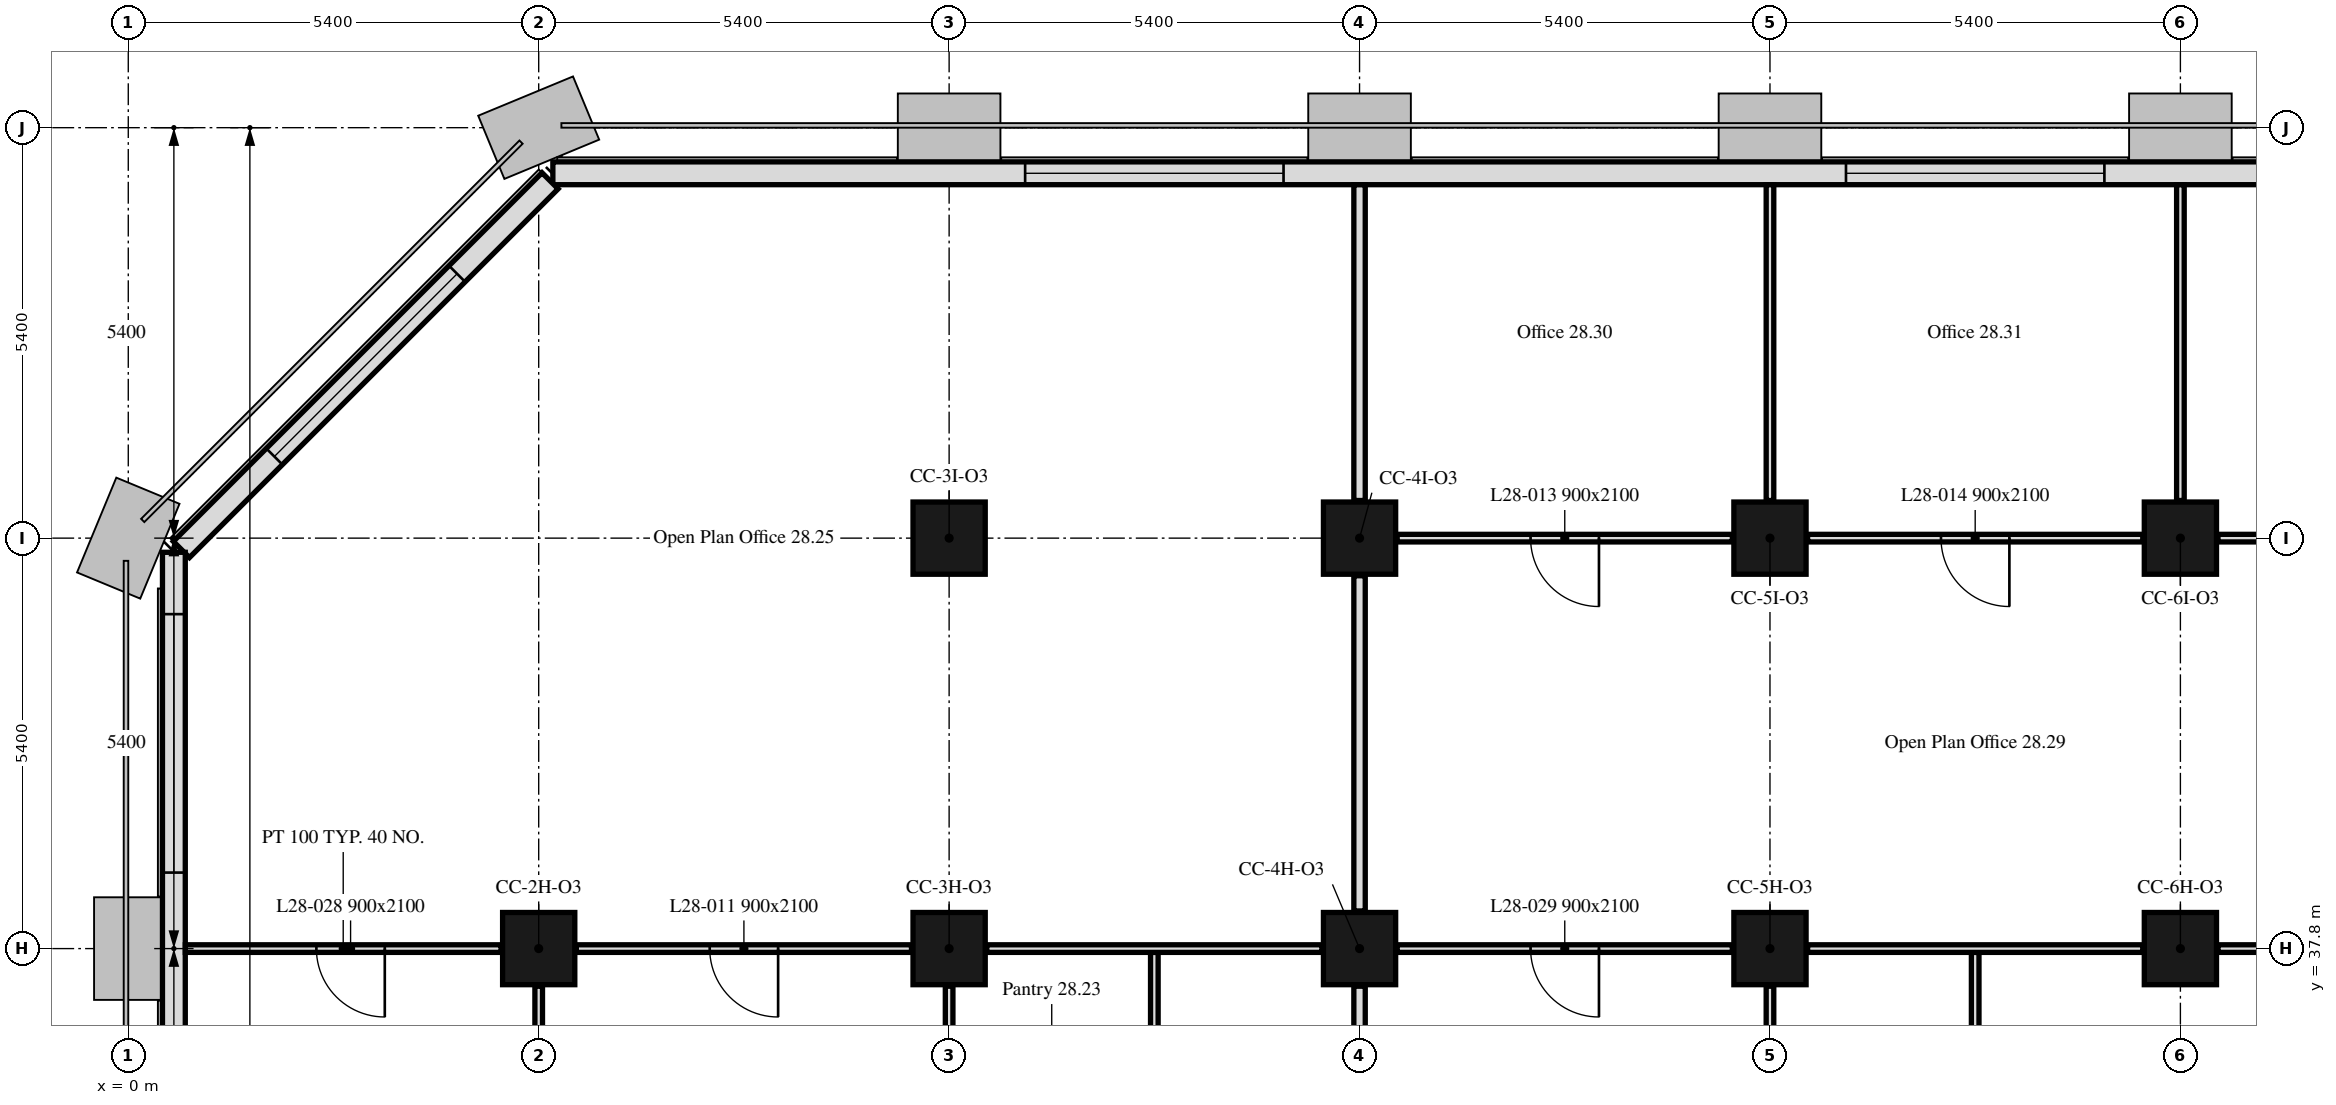
"""IFC4 building model, lengths in metres.
Left out: names, types, materials, properties, quantities, classifications, styles, units other than length and angle.
Written with IfcOpenShell. Run it as: python <this file> out.ifc"""

import sys

from ifc_helpers import new_model, si_unit, direction, frame, frame_2d, origin, origin_2d, place, context, subcontext, project, spatial, rectangle, extrude, element, fill, save


model = new_model("IFC4")
c1 = context("Model", 3, precision=1e-05, world=origin(), true_north=direction((0.0, 1.0)))
c2 = subcontext(c1, "Body", "Model", "MODEL_VIEW")
j1 = project(units=[si_unit("LENGTHUNIT", "METRE"), si_unit("PLANEANGLEUNIT", "RADIAN")], contexts=[c1])
p1 = place(None, origin())
s1 = spatial("IfcSite", under=j1, at=p1, CompositionType="ELEMENT")
p2 = place(p1, origin())
s2 = spatial("IfcBuilding", under=s1, at=p2, CompositionType="ELEMENT")
p3 = place(p2, frame((0.0, 0.0, 118.2)))
s3 = spatial("IfcBuildingStorey", under=s2, at=p3, CompositionType="ELEMENT", Elevation=118.2)
for number, where, z_axis, x_axis in (
    (1, (5.4, 37.8, 0.0), (0.0, 0.0, 1.0), (1.0, 0.0, 0.0)),
    (2, (10.8, 37.8, 0.0), (0.0, 0.0, 1.0), (1.0, 0.0, 0.0)),
    (3, (16.2, 37.8, 0.0), (0.0, 0.0, 1.0), (1.0, 0.0, 0.0)),
    (4, (21.6, 37.8, 0.0), (0.0, 0.0, 1.0), (1.0, 0.0, 0.0)),
    (5, (27.0, 37.8, 0.0), (0.0, 0.0, 1.0), (1.0, 0.0, 0.0)),
    (6, (10.8, 43.2, 0.0), (0.0, 0.0, 1.0), (1.0, 0.0, 0.0)),
    (7, (16.2, 43.2, 0.0), (0.0, 0.0, 1.0), (1.0, 0.0, 0.0)),
    (8, (21.6, 43.2, 0.0), (0.0, 0.0, 1.0), (1.0, 0.0, 0.0)),
    (9, (27.0, 43.2, 0.0), (0.0, 0.0, 1.0), (1.0, 0.0, 0.0)),
):
    element("IfcColumn", number, at=place(p3, frame(where, z_axis=z_axis, x_axis=x_axis)), inside=s3, PredefinedType="COLUMN", context=c2, shape_type="SweptSolid", body=[
        extrude(rectangle(XDim=0.95, YDim=0.95, at=origin_2d()), origin(), (0.0, 0.0, 1.0), 3.5),
    ])
p4 = place(p3, frame((37.614, 48.0, 0.0), z_axis=(0.0, 0.0, 1.0), x_axis=(-1.0, 0.0, 0.0)))
e10 = element("IfcWall", 10, at=p4, inside=s3, PredefinedType="SOLIDWALL", context=c2, shape_type="SweptSolid", body=[
    extrude(rectangle(XDim=32.027, YDim=0.3, at=frame_2d((16.014, 0.0))), origin(), (0.0, 0.0, 1.0), 3.5),
])
p5 = place(p4, frame((0.814, 0.0, 0.9)))
e11 = element("IfcOpeningElement", 11, at=p5, cuts=e10, PredefinedType="OPENING", context=c2, shape_type="SweptSolid", body=[
    extrude(rectangle(XDim=3.4, YDim=1.7, at=frame_2d((1.7, 0.85))), frame((0.0, 0.16, 0.0), z_axis=(0.0, -1.0, 0.0), x_axis=(1.0, 0.0, 0.0)), (0.0, 0.0, 1.0), 0.32),
])
p6 = place(p4, frame((11.614, 0.0, 0.9)))
e12 = element("IfcOpeningElement", 12, at=p6, cuts=e10, PredefinedType="OPENING", context=c2, shape_type="SweptSolid", body=[
    extrude(rectangle(XDim=3.4, YDim=1.7, at=frame_2d((1.7, 0.85))), frame((0.0, 0.16, 0.0), z_axis=(0.0, -1.0, 0.0), x_axis=(1.0, 0.0, 0.0)), (0.0, 0.0, 1.0), 0.32),
])
p7 = place(p4, frame((22.414, 0.0, 0.9)))
e13 = element("IfcOpeningElement", 13, at=p7, cuts=e10, PredefinedType="OPENING", context=c2, shape_type="SweptSolid", body=[
    extrude(rectangle(XDim=3.4, YDim=1.7, at=frame_2d((1.7, 0.85))), frame((0.0, 0.16, 0.0), z_axis=(0.0, -1.0, 0.0), x_axis=(1.0, 0.0, 0.0)), (0.0, 0.0, 1.0), 0.32),
])
p8 = place(p3, frame((5.55, 47.901, 0.0), z_axis=(0.0, 0.0, 1.0), x_axis=(-0.707106781187, -0.707106781187, 0.0)))
e14 = element("IfcWall", 14, at=p8, inside=s3, PredefinedType="SOLIDWALL", context=c2, shape_type="SweptSolid", body=[
    extrude(rectangle(XDim=6.86, YDim=0.3, at=frame_2d((3.43, 0.0))), origin(), (0.0, 0.0, 1.0), 3.5),
])
p9 = place(p8, frame((1.73, 0.0, 0.9)))
e15 = element("IfcOpeningElement", 15, at=p9, cuts=e14, PredefinedType="OPENING", context=c2, shape_type="SweptSolid", body=[
    extrude(rectangle(XDim=3.4, YDim=1.7, at=frame_2d((1.7, 0.85))), frame((0.0, 0.16, 0.0), z_axis=(0.0, -1.0, 0.0), x_axis=(1.0, 0.0, 0.0)), (0.0, 0.0, 1.0), 0.32),
])
p10 = place(p3, frame((0.6, 43.014, 0.0), z_axis=(0.0, 0.0, 1.0), x_axis=(0.0, -1.0, 0.0)))
e16 = element("IfcWall", 16, at=p10, inside=s3, PredefinedType="SOLIDWALL", context=c2, shape_type="SweptSolid", body=[
    extrude(rectangle(XDim=32.027, YDim=0.3, at=frame_2d((16.014, 0.0))), origin(), (0.0, 0.0, 1.0), 3.5),
])
p11 = place(p10, frame((0.814, 0.0, 0.9)))
e17 = element("IfcOpeningElement", 17, at=p11, cuts=e16, PredefinedType="OPENING", context=c2, shape_type="SweptSolid", body=[
    extrude(rectangle(XDim=3.4, YDim=1.7, at=frame_2d((1.7, 0.85))), frame((0.0, 0.16, 0.0), z_axis=(0.0, -1.0, 0.0), x_axis=(1.0, 0.0, 0.0)), (0.0, 0.0, 1.0), 0.32),
])
p12 = place(p10, frame((11.614, 0.0, 0.9)))
e18 = element("IfcOpeningElement", 18, at=p12, cuts=e16, PredefinedType="OPENING", context=c2, shape_type="SweptSolid", body=[
    extrude(rectangle(XDim=3.4, YDim=1.7, at=frame_2d((1.7, 0.85))), frame((0.0, 0.16, 0.0), z_axis=(0.0, -1.0, 0.0), x_axis=(1.0, 0.0, 0.0)), (0.0, 0.0, 1.0), 0.32),
])
p13 = place(p10, frame((22.414, 0.0, 0.9)))
e19 = element("IfcOpeningElement", 19, at=p13, cuts=e16, PredefinedType="OPENING", context=c2, shape_type="SweptSolid", body=[
    extrude(rectangle(XDim=3.4, YDim=1.7, at=frame_2d((1.7, 0.85))), frame((0.0, 0.16, 0.0), z_axis=(0.0, -1.0, 0.0), x_axis=(1.0, 0.0, 0.0)), (0.0, 0.0, 1.0), 0.32),
])
p14 = place(p3, frame((4.905, 37.8, 0.0), z_axis=(0.0, 0.0, 1.0), x_axis=(-1.0, 0.0, 0.0)))
e20 = element("IfcWall", 20, at=p14, inside=s3, PredefinedType="PARTITIONING", context=c2, shape_type="SweptSolid", body=[
    extrude(rectangle(XDim=4.154, YDim=0.1, at=frame_2d((2.077, 0.0))), origin(), (0.0, 0.0, 1.0), 2.75),
])
p15 = place(p14, frame((1.53, 0.0, 0.0)))
e21 = element("IfcOpeningElement", 21, at=p15, cuts=e20, PredefinedType="OPENING", context=c2, shape_type="SweptSolid", body=[
    extrude(rectangle(XDim=0.9, YDim=2.1, at=frame_2d((0.45, 1.05))), frame((0.0, 0.05, 0.0), z_axis=(0.0, -1.0, 0.0), x_axis=(1.0, 0.0, 0.0)), (0.0, 0.0, 1.0), 0.1),
])
p16 = place(p3, frame((5.4, 35.175, 0.0), z_axis=(0.0, 0.0, 1.0), x_axis=(0.0, 1.0, 0.0)))
e22 = element("IfcWall", 22, at=p16, inside=s3, PredefinedType="PARTITIONING", context=c2, shape_type="SweptSolid", body=[
    extrude(rectangle(XDim=2.13, YDim=0.1, at=frame_2d((1.065, 0.0))), origin(), (0.0, 0.0, 1.0), 3.5),
])
p17 = place(p3, frame((10.8, 35.175, 0.0), z_axis=(0.0, 0.0, 1.0), x_axis=(0.0, 1.0, 0.0)))
e23 = element("IfcWall", 23, at=p17, inside=s3, PredefinedType="PARTITIONING", context=c2, shape_type="SweptSolid", body=[
    extrude(rectangle(XDim=2.13, YDim=0.1, at=frame_2d((1.065, 0.0))), origin(), (0.0, 0.0, 1.0), 2.75),
])
p18 = place(p3, frame((10.305, 37.8, 0.0), z_axis=(0.0, 0.0, 1.0), x_axis=(-1.0, 0.0, 0.0)))
e24 = element("IfcWall", 24, at=p18, inside=s3, PredefinedType="PARTITIONING", context=c2, shape_type="SweptSolid", body=[
    extrude(rectangle(XDim=4.41, YDim=0.1, at=frame_2d((2.205, 0.0))), origin(), (0.0, 0.0, 1.0), 2.75),
])
p19 = place(p18, frame((1.755, 0.0, 0.0)))
e25 = element("IfcOpeningElement", 25, at=p19, cuts=e24, PredefinedType="OPENING", context=c2, shape_type="SweptSolid", body=[
    extrude(rectangle(XDim=0.9, YDim=2.1, at=frame_2d((0.45, 1.05))), frame((0.0, 0.05, 0.0), z_axis=(0.0, -1.0, 0.0), x_axis=(1.0, 0.0, 0.0)), (0.0, 0.0, 1.0), 0.1),
])
p20 = place(p3, frame((13.5, 35.175, 0.0), z_axis=(0.0, 0.0, 1.0), x_axis=(0.0, 1.0, 0.0)))
e26 = element("IfcWall", 26, at=p20, inside=s3, PredefinedType="PARTITIONING", context=c2, shape_type="SweptSolid", body=[
    extrude(rectangle(XDim=2.575, YDim=0.1, at=frame_2d((1.288, 0.0))), origin(), (0.0, 0.0, 1.0), 3.5),
])
p21 = place(p3, frame((16.2, 35.175, 0.0), z_axis=(0.0, 0.0, 1.0), x_axis=(0.0, 1.0, 0.0)))
e27 = element("IfcWall", 27, at=p21, inside=s3, PredefinedType="PARTITIONING", context=c2, shape_type="SweptSolid", body=[
    extrude(rectangle(XDim=2.13, YDim=0.15, at=frame_2d((1.065, 0.0))), origin(), (0.0, 0.0, 1.0), 2.75),
])
p22 = place(p3, frame((15.705, 37.8, 0.0), z_axis=(0.0, 0.0, 1.0), x_axis=(-1.0, 0.0, 0.0)))
e28 = element("IfcWall", 28, at=p22, inside=s3, PredefinedType="PARTITIONING", context=c2, shape_type="SweptSolid", body=[
    extrude(rectangle(XDim=4.41, YDim=0.1, at=frame_2d((2.205, 0.0))), origin(), (0.0, 0.0, 1.0), 2.75),
])
p23 = place(p3, frame((16.2, 38.295, 0.0), z_axis=(0.0, 0.0, 1.0), x_axis=(0.0, 1.0, 0.0)))
e29 = element("IfcWall", 29, at=p23, inside=s3, PredefinedType="PARTITIONING", context=c2, shape_type="SweptSolid", body=[
    extrude(rectangle(XDim=4.41, YDim=0.15, at=frame_2d((2.205, 0.0))), origin(), (0.0, 0.0, 1.0), 2.75),
])
p24 = place(p3, frame((16.2, 43.695, 0.0), z_axis=(0.0, 0.0, 1.0), x_axis=(0.0, 1.0, 0.0)))
e30 = element("IfcWall", 30, at=p24, inside=s3, PredefinedType="PARTITIONING", context=c2, shape_type="SweptSolid", body=[
    extrude(rectangle(XDim=4.154, YDim=0.15, at=frame_2d((2.077, 0.0))), origin(), (0.0, 0.0, 1.0), 2.75),
])
p25 = place(p3, frame((21.6, 35.175, 0.0), z_axis=(0.0, 0.0, 1.0), x_axis=(0.0, 1.0, 0.0)))
e31 = element("IfcWall", 31, at=p25, inside=s3, PredefinedType="PARTITIONING", context=c2, shape_type="SweptSolid", body=[
    extrude(rectangle(XDim=2.13, YDim=0.1, at=frame_2d((1.065, 0.0))), origin(), (0.0, 0.0, 1.0), 2.75),
])
p26 = place(p3, frame((21.105, 37.8, 0.0), z_axis=(0.0, 0.0, 1.0), x_axis=(-1.0, 0.0, 0.0)))
e32 = element("IfcWall", 32, at=p26, inside=s3, PredefinedType="PARTITIONING", context=c2, shape_type="SweptSolid", body=[
    extrude(rectangle(XDim=4.41, YDim=0.1, at=frame_2d((2.205, 0.0))), origin(), (0.0, 0.0, 1.0), 3.5),
])
p27 = place(p26, frame((1.755, 0.0, 0.0)))
e33 = element("IfcOpeningElement", 33, at=p27, cuts=e32, PredefinedType="OPENING", context=c2, shape_type="SweptSolid", body=[
    extrude(rectangle(XDim=0.9, YDim=2.1, at=frame_2d((0.45, 1.05))), frame((0.0, 0.05, 0.0), z_axis=(0.0, -1.0, 0.0), x_axis=(1.0, 0.0, 0.0)), (0.0, 0.0, 1.0), 0.1),
])
p28 = place(p3, frame((24.3, 35.175, 0.0), z_axis=(0.0, 0.0, 1.0), x_axis=(0.0, 1.0, 0.0)))
e34 = element("IfcWall", 34, at=p28, inside=s3, PredefinedType="PARTITIONING", context=c2, shape_type="SweptSolid", body=[
    extrude(rectangle(XDim=2.575, YDim=0.1, at=frame_2d((1.288, 0.0))), origin(), (0.0, 0.0, 1.0), 3.5),
])
p29 = place(p3, frame((31.905, 37.8, 0.0), z_axis=(0.0, 0.0, 1.0), x_axis=(-1.0, 0.0, 0.0)))
e35 = element("IfcWall", 35, at=p29, inside=s3, PredefinedType="PARTITIONING", context=c2, shape_type="SweptSolid", body=[
    extrude(rectangle(XDim=4.41, YDim=0.1, at=frame_2d((2.205, 0.0))), origin(), (0.0, 0.0, 1.0), 3.5),
])
p30 = place(p29, frame((1.755, 0.0, 0.0)))
e36 = element("IfcOpeningElement", 36, at=p30, cuts=e35, PredefinedType="OPENING", context=c2, shape_type="SweptSolid", body=[
    extrude(rectangle(XDim=0.9, YDim=2.1, at=frame_2d((0.45, 1.05))), frame((0.0, 0.05, 0.0), z_axis=(0.0, -1.0, 0.0), x_axis=(1.0, 0.0, 0.0)), (0.0, 0.0, 1.0), 0.1),
])
p31 = place(p3, frame((26.505, 37.8, 0.0), z_axis=(0.0, 0.0, 1.0), x_axis=(-1.0, 0.0, 0.0)))
e37 = element("IfcWall", 37, at=p31, inside=s3, PredefinedType="PARTITIONING", context=c2, shape_type="SweptSolid", body=[
    extrude(rectangle(XDim=4.41, YDim=0.1, at=frame_2d((2.205, 0.0))), origin(), (0.0, 0.0, 1.0), 3.5),
])
p32 = place(p3, frame((31.905, 43.2, 0.0), z_axis=(0.0, 0.0, 1.0), x_axis=(-1.0, 0.0, 0.0)))
e38 = element("IfcWall", 38, at=p32, inside=s3, PredefinedType="PARTITIONING", context=c2, shape_type="SweptSolid", body=[
    extrude(rectangle(XDim=4.41, YDim=0.1, at=frame_2d((2.205, 0.0))), origin(), (0.0, 0.0, 1.0), 3.5),
])
p33 = place(p32, frame((1.755, 0.0, 0.0)))
e39 = element("IfcOpeningElement", 39, at=p33, cuts=e38, PredefinedType="OPENING", context=c2, shape_type="SweptSolid", body=[
    extrude(rectangle(XDim=0.9, YDim=2.1, at=frame_2d((0.45, 1.05))), frame((0.0, 0.05, 0.0), z_axis=(0.0, -1.0, 0.0), x_axis=(1.0, 0.0, 0.0)), (0.0, 0.0, 1.0), 0.1),
])
p34 = place(p3, frame((26.505, 43.2, 0.0), z_axis=(0.0, 0.0, 1.0), x_axis=(-1.0, 0.0, 0.0)))
e40 = element("IfcWall", 40, at=p34, inside=s3, PredefinedType="PARTITIONING", context=c2, shape_type="SweptSolid", body=[
    extrude(rectangle(XDim=4.41, YDim=0.1, at=frame_2d((2.205, 0.0))), origin(), (0.0, 0.0, 1.0), 3.5),
])
p35 = place(p34, frame((1.755, 0.0, 0.0)))
e41 = element("IfcOpeningElement", 41, at=p35, cuts=e40, PredefinedType="OPENING", context=c2, shape_type="SweptSolid", body=[
    extrude(rectangle(XDim=0.9, YDim=2.1, at=frame_2d((0.45, 1.05))), frame((0.0, 0.05, 0.0), z_axis=(0.0, -1.0, 0.0), x_axis=(1.0, 0.0, 0.0)), (0.0, 0.0, 1.0), 0.1),
])
p36 = place(p3, frame((21.105, 43.2, 0.0), z_axis=(0.0, 0.0, 1.0), x_axis=(-1.0, 0.0, 0.0)))
e42 = element("IfcWall", 42, at=p36, inside=s3, PredefinedType="PARTITIONING", context=c2, shape_type="SweptSolid", body=[
    extrude(rectangle(XDim=4.41, YDim=0.1, at=frame_2d((2.205, 0.0))), origin(), (0.0, 0.0, 1.0), 3.5),
])
p37 = place(p36, frame((1.755, 0.0, 0.0)))
e43 = element("IfcOpeningElement", 43, at=p37, cuts=e42, PredefinedType="OPENING", context=c2, shape_type="SweptSolid", body=[
    extrude(rectangle(XDim=0.9, YDim=2.1, at=frame_2d((0.45, 1.05))), frame((0.0, 0.05, 0.0), z_axis=(0.0, -1.0, 0.0), x_axis=(1.0, 0.0, 0.0)), (0.0, 0.0, 1.0), 0.1),
])
for number, where, z_axis, x_axis in (
    (44, (21.6, 43.695, 0.0), (0.0, 0.0, 1.0), (0.0, 1.0, 0.0)),
    (45, (27.0, 43.695, 0.0), (0.0, 0.0, 1.0), (0.0, 1.0, 0.0)),
):
    element("IfcWall", number, at=place(p3, frame(where, z_axis=z_axis, x_axis=x_axis)), inside=s3, PredefinedType="PARTITIONING", context=c2, shape_type="SweptSolid", body=[
        extrude(rectangle(XDim=4.154, YDim=0.1, at=frame_2d((2.077, 0.0))), origin(), (0.0, 0.0, 1.0), 2.75),
    ])
p38 = place(p6, origin())
e46 = element("IfcWindow", 46, at=p38, inside=s3, PartitioningType="SINGLE_PANEL", PredefinedType="WINDOW", context=c2, shape_type="SweptSolid", body=[
    extrude(rectangle(XDim=3.4, YDim=1.7, at=frame_2d((1.7, 0.85))), frame((0.0, 0.03, 0.0), z_axis=(0.0, -1.0, 0.0), x_axis=(1.0, 0.0, 0.0)), (0.0, 0.0, 1.0), 0.06),
])
fill(e12, e46)
p39 = place(p7, origin())
e47 = element("IfcWindow", 47, at=p39, inside=s3, PartitioningType="SINGLE_PANEL", PredefinedType="WINDOW", context=c2, shape_type="SweptSolid", body=[
    extrude(rectangle(XDim=3.4, YDim=1.7, at=frame_2d((1.7, 0.85))), frame((0.0, 0.03, 0.0), z_axis=(0.0, -1.0, 0.0), x_axis=(1.0, 0.0, 0.0)), (0.0, 0.0, 1.0), 0.06),
])
fill(e13, e47)
p40 = place(p9, origin())
e48 = element("IfcWindow", 48, at=p40, inside=s3, PartitioningType="SINGLE_PANEL", PredefinedType="WINDOW", context=c2, shape_type="SweptSolid", body=[
    extrude(rectangle(XDim=3.4, YDim=1.7, at=frame_2d((1.7, 0.85))), frame((0.0, 0.03, 0.0), z_axis=(0.0, -1.0, 0.0), x_axis=(1.0, 0.0, 0.0)), (0.0, 0.0, 1.0), 0.06),
])
fill(e15, e48)
p41 = place(p11, origin())
e49 = element("IfcWindow", 49, at=p41, inside=s3, PartitioningType="SINGLE_PANEL", PredefinedType="WINDOW", context=c2, shape_type="SweptSolid", body=[
    extrude(rectangle(XDim=3.4, YDim=1.7, at=frame_2d((1.7, 0.85))), frame((0.0, 0.03, 0.0), z_axis=(0.0, -1.0, 0.0), x_axis=(1.0, 0.0, 0.0)), (0.0, 0.0, 1.0), 0.06),
])
fill(e17, e49)
p42 = place(p19, origin())
e50 = element("IfcDoor", 50, at=p42, inside=s3, OperationType="SINGLE_SWING_LEFT", PredefinedType="DOOR", context=c2, shape_type="SweptSolid", body=[
    extrude(rectangle(XDim=0.9, YDim=2.1, at=frame_2d((0.45, 1.05))), frame((0.0, 0.025, 0.0), z_axis=(0.0, -1.0, 0.0), x_axis=(1.0, 0.0, 0.0)), (0.0, 0.0, 1.0), 0.05),
])
fill(e25, e50)
p43 = place(p37, origin())
e51 = element("IfcDoor", 51, at=p43, inside=s3, OperationType="SINGLE_SWING_RIGHT", PredefinedType="DOOR", context=c2, shape_type="SweptSolid", body=[
    extrude(rectangle(XDim=0.9, YDim=2.1, at=frame_2d((0.45, 1.05))), frame((0.0, 0.025, 0.0), z_axis=(0.0, -1.0, 0.0), x_axis=(1.0, 0.0, 0.0)), (0.0, 0.0, 1.0), 0.05),
])
fill(e43, e51)
p44 = place(p35, origin())
e52 = element("IfcDoor", 52, at=p44, inside=s3, OperationType="SINGLE_SWING_RIGHT", PredefinedType="DOOR", context=c2, shape_type="SweptSolid", body=[
    extrude(rectangle(XDim=0.9, YDim=2.1, at=frame_2d((0.45, 1.05))), frame((0.0, 0.025, 0.0), z_axis=(0.0, -1.0, 0.0), x_axis=(1.0, 0.0, 0.0)), (0.0, 0.0, 1.0), 0.05),
])
fill(e41, e52)
p45 = place(p15, origin())
e53 = element("IfcDoor", 53, at=p45, inside=s3, OperationType="SINGLE_SWING_RIGHT", PredefinedType="DOOR", context=c2, shape_type="SweptSolid", body=[
    extrude(rectangle(XDim=0.9, YDim=2.1, at=frame_2d((0.45, 1.05))), frame((0.0, 0.025, 0.0), z_axis=(0.0, -1.0, 0.0), x_axis=(1.0, 0.0, 0.0)), (0.0, 0.0, 1.0), 0.05),
])
fill(e21, e53)
p46 = place(p27, origin())
e54 = element("IfcDoor", 54, at=p46, inside=s3, OperationType="SINGLE_SWING_LEFT", PredefinedType="DOOR", context=c2, shape_type="SweptSolid", body=[
    extrude(rectangle(XDim=0.9, YDim=2.1, at=frame_2d((0.45, 1.05))), frame((0.0, 0.025, 0.0), z_axis=(0.0, -1.0, 0.0), x_axis=(1.0, 0.0, 0.0)), (0.0, 0.0, 1.0), 0.05),
])
fill(e33, e54)
save(model, sys.argv[1])
